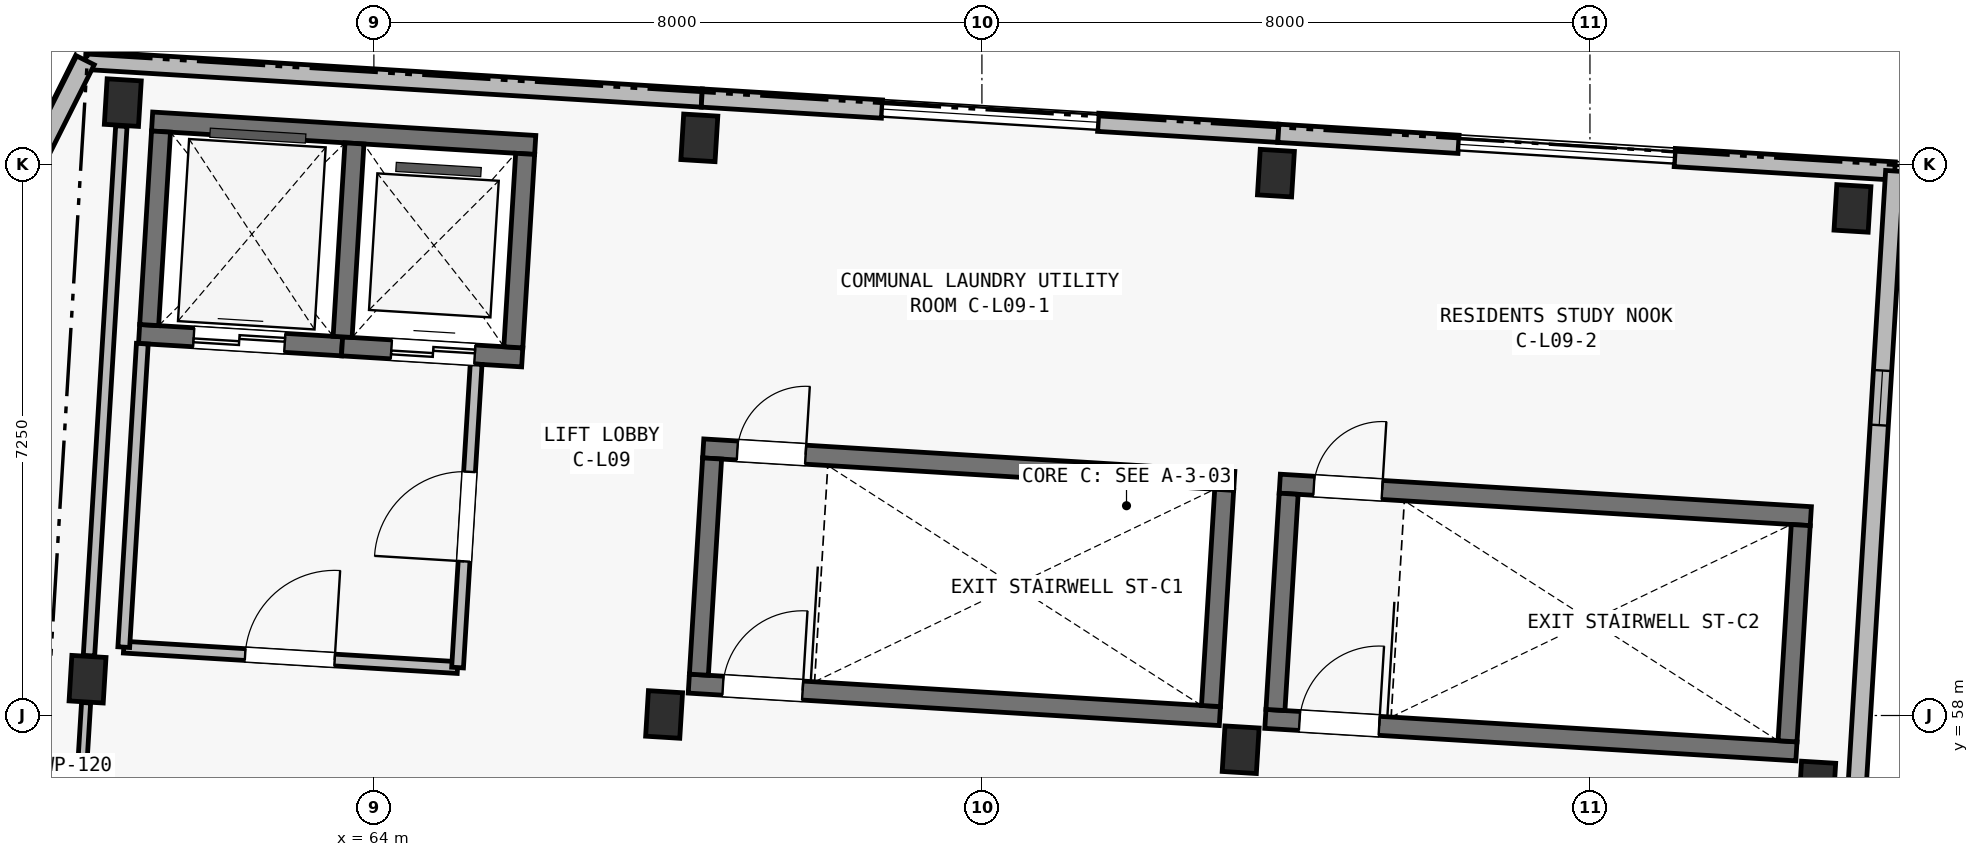
"""IFC4 building model, lengths in metres.
Left out: names, types, materials, properties, quantities, classifications, styles, units other than length and angle.
Written with IfcOpenShell. Run it as: python <this file> out.ifc"""

import sys

from ifc_helpers import new_model, si_unit, direction, frame, frame_2d, origin, origin_2d, place, context, subcontext, project, spatial, polyline, rectangle, outline, extrude, element, fill, save


model = new_model("IFC4")
c1 = context("Model", 3, precision=1e-05, world=origin(), true_north=direction((0.0, 1.0)))
c2 = subcontext(c1, "Body", "Model", "MODEL_VIEW")
j1 = project(units=[si_unit("LENGTHUNIT", "METRE"), si_unit("PLANEANGLEUNIT", "RADIAN")], contexts=[c1])
p1 = place(None, origin())
s1 = spatial("IfcSite", under=j1, at=p1, CompositionType="ELEMENT")
p2 = place(p1, origin())
s2 = spatial("IfcBuilding", under=s1, at=p2, CompositionType="ELEMENT")
p3 = place(p2, frame((0.0, 0.0, 31.15)))
s3 = spatial("IfcBuildingStorey", under=s2, at=p3, CompositionType="ELEMENT", Elevation=31.15)
for number, where, z_axis, x_axis in (
    (1, (60.233, 58.478, 0.0), (0.0, 0.0, 1.0), (0.998, -0.061, 0.0)),
    (2, (60.697, 66.063, 0.0), (0.0, 0.0, 1.0), (0.998, -0.061, 0.0)),
):
    element("IfcColumn", number, at=place(p3, frame(where, z_axis=z_axis, x_axis=x_axis)), inside=s3, PredefinedType="COLUMN", context=c2, shape_type="SweptSolid", body=[
        extrude(rectangle(XDim=0.45, YDim=0.6, at=origin_2d()), origin(), (0.0, 0.0, 1.0), 6.895),
    ])
for number, where, z_axis, x_axis in (
    (3, (67.818, 58.014, 0.0), (0.0, 0.0, 1.0), (0.998, -0.061, 0.0)),
    (4, (68.282, 65.599, 0.0), (0.0, 0.0, 1.0), (0.998, -0.061, 0.0)),
    (5, (75.404, 57.55, 0.0), (0.0, 0.0, 1.0), (0.998, -0.061, 0.0)),
    (6, (75.868, 65.135, 0.0), (0.0, 0.0, 1.0), (0.998, -0.061, 0.0)),
):
    element("IfcColumn", number, at=place(p3, frame(where, z_axis=z_axis, x_axis=x_axis)), inside=s3, PredefinedType="COLUMN", context=c2, shape_type="SweptSolid", body=[
        extrude(rectangle(XDim=0.45, YDim=0.6, at=origin_2d()), origin(), (0.0, 0.0, 1.0), 3.25),
    ])
for number, where, z_axis, x_axis in (
    (7, (82.99, 57.086, 0.0), (0.0, 0.0, 1.0), (0.998, -0.061, 0.0)),
    (8, (83.454, 64.672, 0.0), (0.0, 0.0, 1.0), (0.998, -0.061, 0.0)),
):
    element("IfcColumn", number, at=place(p3, frame(where, z_axis=z_axis, x_axis=x_axis)), inside=s3, PredefinedType="COLUMN", context=c2, shape_type="SweptSolid", body=[
        extrude(rectangle(XDim=0.45, YDim=0.6, at=origin_2d()), origin(), (0.0, 0.0, 1.0), 3.0),
    ])
p4 = place(p3, frame((61.082, 65.814, 0.0), z_axis=(0.0, 0.0, 1.0), x_axis=(0.998134101522, -0.061059932685, 0.0)))
e9 = element("IfcWall", 9, at=p4, inside=s3, PredefinedType="SHEAR", context=c2, shape_type="SweptSolid", body=[
    extrude(rectangle(XDim=5.05, YDim=0.25, at=frame_2d((2.525, 0.0))), origin(), (0.0, 0.0, 1.0), 4.35),
])
p5 = place(p3, frame((60.911, 63.02, 0.0), z_axis=(0.0, 0.0, 1.0), x_axis=(0.998134099905, -0.061059959111, 0.0)))
e10 = element("IfcWall", 10, at=p5, inside=s3, PredefinedType="SHEAR", context=c2, shape_type="SweptSolid", body=[
    extrude(rectangle(XDim=2.675, YDim=0.25, at=frame_2d((1.337, 0.0))), origin(), (0.0, 0.0, 1.0), 4.35),
])
p6 = place(p5, frame((0.72, 0.0, 0.0)))
e11 = element("IfcOpeningElement", 11, at=p6, cuts=e10, PredefinedType="OPENING", context=c2, shape_type="SweptSolid", body=[
    extrude(rectangle(XDim=1.2, YDim=2.2, at=frame_2d((0.6, 1.1))), frame((0.0, 0.14, 0.0), z_axis=(0.0, -1.0, 0.0), x_axis=(1.0, 0.0, 0.0)), (0.0, 0.0, 1.0), 0.28),
])
p7 = place(p3, frame((63.581, 62.856, 0.0), z_axis=(0.0, 0.0, 1.0), x_axis=(0.998134103342, -0.061059902923, 0.0)))
e12 = element("IfcWall", 12, at=p7, inside=s3, PredefinedType="SHEAR", context=c2, shape_type="SweptSolid", body=[
    extrude(rectangle(XDim=2.375, YDim=0.25, at=frame_2d((1.188, 0.0))), origin(), (0.0, 0.0, 1.0), 4.35),
])
p8 = place(p7, frame((0.65, 0.0, 0.0)))
e13 = element("IfcOpeningElement", 13, at=p8, cuts=e12, PredefinedType="OPENING", context=c2, shape_type="SweptSolid", body=[
    extrude(rectangle(XDim=1.1, YDim=2.15, at=frame_2d((0.55, 1.075))), frame((0.0, 0.14, 0.0), z_axis=(0.0, -1.0, 0.0), x_axis=(1.0, 0.0, 0.0)), (0.0, 0.0, 1.0), 0.28),
])
p9 = place(p3, frame((61.043, 63.137, 0.0), z_axis=(0.0, 0.0, 1.0), x_axis=(0.061078919587, 0.998132939834, 0.0)))
e14 = element("IfcWall", 14, at=p9, inside=s3, PredefinedType="SHEAR", context=c2, shape_type="SweptSolid", body=[
    extrude(rectangle(XDim=2.55, YDim=0.25, at=frame_2d((1.275, 0.0))), origin(), (0.0, 0.0, 1.0), 4.35),
])
p10 = place(p3, frame((63.589, 62.981, 0.0), z_axis=(0.0, 0.0, 1.0), x_axis=(0.060989368901, 0.998138415692, 0.0)))
e15 = element("IfcWall", 15, at=p10, inside=s3, PredefinedType="SHEAR", context=c2, shape_type="SweptSolid", body=[
    extrude(rectangle(XDim=2.55, YDim=0.25, at=frame_2d((1.275, 0.0))), origin(), (0.0, 0.0, 1.0), 4.35),
])
p11 = place(p3, frame((65.834, 62.844, 0.0), z_axis=(0.0, 0.0, 1.0), x_axis=(0.061084756616, 0.998132582631, 0.0)))
e16 = element("IfcWall", 16, at=p11, inside=s3, PredefinedType="SHEAR", context=c2, shape_type="SweptSolid", body=[
    extrude(rectangle(XDim=2.55, YDim=0.25, at=frame_2d((1.275, 0.0))), origin(), (0.0, 0.0, 1.0), 4.35),
])
p12 = place(p3, frame((68.333, 61.514, 0.0), z_axis=(0.0, 0.0, 1.0), x_axis=(0.998135676081, -0.061034188237, 0.0)))
e17 = element("IfcWall", 17, at=p12, inside=s3, PredefinedType="SHEAR", context=c2, shape_type="SweptSolid", body=[
    extrude(rectangle(XDim=7.0, YDim=0.25, at=frame_2d((3.5, 0.0))), origin(), (0.0, 0.0, 1.0), 3.25),
])
p13 = place(p12, frame((0.45, 0.0, 0.0)))
e18 = element("IfcOpeningElement", 18, at=p13, cuts=e17, PredefinedType="OPENING", context=c2, shape_type="SweptSolid", body=[
    extrude(rectangle(XDim=0.9, YDim=2.1, at=frame_2d((0.45, 1.05))), frame((0.0, 0.14, 0.0), z_axis=(0.0, -1.0, 0.0), x_axis=(1.0, 0.0, 0.0)), (0.0, 0.0, 1.0), 0.28),
])
p14 = place(p3, frame((68.144, 58.419, 0.0), z_axis=(0.0, 0.0, 1.0), x_axis=(0.998135546153, -0.061036313012, 0.0)))
e19 = element("IfcWall", 19, at=p14, inside=s3, PredefinedType="SHEAR", context=c2, shape_type="SweptSolid", body=[
    extrude(rectangle(XDim=7.0, YDim=0.25, at=frame_2d((3.5, 0.0))), origin(), (0.0, 0.0, 1.0), 3.25),
])
p15 = place(p14, frame((0.45, 0.0, 0.0)))
e20 = element("IfcOpeningElement", 20, at=p15, cuts=e19, PredefinedType="OPENING", context=c2, shape_type="SweptSolid", body=[
    extrude(rectangle(XDim=1.05, YDim=2.15, at=frame_2d((0.525, 1.075))), frame((0.0, 0.14, 0.0), z_axis=(0.0, -1.0, 0.0), x_axis=(1.0, 0.0, 0.0)), (0.0, 0.0, 1.0), 0.28),
])
for number, where, z_axis, x_axis in (
    (21, (68.276, 58.537, 0.0), (0.0, 0.0, 1.0), (0.061, 0.998, 0.0)),
    (22, (75.014, 58.125, 0.0), (0.0, 0.0, 1.0), (0.061, 0.998, 0.0)),
):
    element("IfcWall", number, at=place(p3, frame(where, z_axis=z_axis, x_axis=x_axis)), inside=s3, PredefinedType="SHEAR", context=c2, shape_type="SweptSolid", body=[
        extrude(rectangle(XDim=2.85, YDim=0.25, at=frame_2d((1.425, 0.0))), origin(), (0.0, 0.0, 1.0), 3.25),
    ])
p16 = place(p3, frame((75.919, 61.05, 0.0), z_axis=(0.0, 0.0, 1.0), x_axis=(0.998135546153, -0.061036313012, 0.0)))
e23 = element("IfcWall", 23, at=p16, inside=s3, PredefinedType="SHEAR", context=c2, shape_type="SweptSolid", body=[
    extrude(rectangle(XDim=7.0, YDim=0.25, at=frame_2d((3.5, 0.0))), origin(), (0.0, 0.0, 1.0), 2.708),
])
p17 = place(p16, frame((0.45, 0.0, 0.0)))
e24 = element("IfcOpeningElement", 24, at=p17, cuts=e23, PredefinedType="OPENING", context=c2, shape_type="SweptSolid", body=[
    extrude(rectangle(XDim=0.9, YDim=2.1, at=frame_2d((0.45, 1.05))), frame((0.0, 0.14, 0.0), z_axis=(0.0, -1.0, 0.0), x_axis=(1.0, 0.0, 0.0)), (0.0, 0.0, 1.0), 0.28),
])
p18 = place(p3, frame((75.73, 57.956, 0.0), z_axis=(0.0, 0.0, 1.0), x_axis=(0.998135546153, -0.061036313012, 0.0)))
e25 = element("IfcWall", 25, at=p18, inside=s3, PredefinedType="SHEAR", context=c2, shape_type="SweptSolid", body=[
    extrude(rectangle(XDim=7.0, YDim=0.25, at=frame_2d((3.5, 0.0))), origin(), (0.0, 0.0, 1.0), 2.708),
])
p19 = place(p18, frame((0.45, 0.0, 0.0)))
e26 = element("IfcOpeningElement", 26, at=p19, cuts=e25, PredefinedType="OPENING", context=c2, shape_type="SweptSolid", body=[
    extrude(rectangle(XDim=1.05, YDim=2.15, at=frame_2d((0.525, 1.075))), frame((0.0, 0.14, 0.0), z_axis=(0.0, -1.0, 0.0), x_axis=(1.0, 0.0, 0.0)), (0.0, 0.0, 1.0), 0.28),
])
for number, where, z_axis, x_axis in (
    (27, (75.862, 58.073, 0.0), (0.0, 0.0, 1.0), (0.061, 0.998, 0.0)),
    (28, (82.599, 57.661, 0.0), (0.0, 0.0, 1.0), (0.061, 0.998, 0.0)),
):
    element("IfcWall", number, at=place(p3, frame(where, z_axis=z_axis, x_axis=x_axis)), inside=s3, PredefinedType="SHEAR", context=c2, shape_type="SweptSolid", body=[
        extrude(rectangle(XDim=2.85, YDim=0.25, at=frame_2d((1.425, 0.0))), origin(), (0.0, 0.0, 1.0), 2.708),
    ])
p20 = place(p3, frame((60.205, 66.62, 0.0), z_axis=(0.0, 0.0, 1.0), x_axis=(0.998134248939, -0.061057522844, 0.0)))
e29 = element("IfcWall", 29, at=p20, inside=s3, PredefinedType="SOLIDWALL", context=c2, shape_type="SweptSolid", body=[
    extrude(outline(polyline([(0.0, 0.0), (8.125, 0.0), (8.125, 5.998), (0.0, 7.561), (0.0, 0.0)])), frame((0.0, 0.12, 0.0), z_axis=(0.0, -1.0, 0.0), x_axis=(1.0, 0.0, 0.0)), (0.0, 0.0, 1.0), 0.24),
])
p21 = place(p3, frame((68.314, 66.124, 0.0), z_axis=(0.0, 0.0, 1.0), x_axis=(0.998134103342, -0.061059902923, 0.0)))
e30 = element("IfcWall", 30, at=p21, inside=s3, PredefinedType="SOLIDWALL", context=c2, shape_type="SweptSolid", body=[
    extrude(outline(polyline([(0.0, 0.0), (2.375, 0.0), (2.375, 5.541), (0.0, 5.998), (0.0, 0.0)])), frame((0.0, 0.12, 0.0), z_axis=(0.0, -1.0, 0.0), x_axis=(1.0, 0.0, 0.0)), (0.0, 0.0, 1.0), 0.24),
])
p22 = place(p3, frame((73.53, 65.804, 0.0), z_axis=(0.0, 0.0, 1.0), x_axis=(0.998133720034, -0.061066168473, 0.0)))
e31 = element("IfcWall", 31, at=p22, inside=s3, PredefinedType="SOLIDWALL", context=c2, shape_type="SweptSolid", body=[
    extrude(outline(polyline([(0.0, 0.0), (2.375, 0.0), (2.375, 4.535), (0.0, 4.992), (0.0, 0.0)])), frame((0.0, 0.12, 0.0), z_axis=(0.0, -1.0, 0.0), x_axis=(1.0, 0.0, 0.0)), (0.0, 0.0, 1.0), 0.24),
])
p23 = place(p3, frame((75.9, 65.659, 0.0), z_axis=(0.0, 0.0, 1.0), x_axis=(0.998140363035, -0.06095749076, 0.0)))
e32 = element("IfcWall", 32, at=p23, inside=s3, PredefinedType="SOLIDWALL", context=c2, shape_type="SweptSolid", body=[
    extrude(outline(polyline([(0.0, 0.0), (2.375, 0.0), (2.375, 4.079), (0.0, 4.535), (0.0, 0.0)])), frame((0.0, 0.12, 0.0), z_axis=(0.0, -1.0, 0.0), x_axis=(1.0, 0.0, 0.0)), (0.0, 0.0, 1.0), 0.24),
])
p24 = place(p3, frame((81.115, 65.341, 0.0), z_axis=(0.0, 0.0, 1.0), x_axis=(0.998135537192, -0.061036459553, 0.0)))
e33 = element("IfcWall", 33, at=p24, inside=s3, PredefinedType="SOLIDWALL", context=c2, shape_type="SweptSolid", body=[
    extrude(outline(polyline([(0.0, 0.0), (2.9, 0.0), (2.9, 2.972), (0.0, 3.53), (0.0, 0.0)])), frame((0.0, 0.12, 0.0), z_axis=(0.0, -1.0, 0.0), x_axis=(1.0, 0.0, 0.0)), (0.0, 0.0, 1.0), 0.24),
])
p25 = place(p3, frame((51.654, 49.585, 0.0), z_axis=(0.0, 0.0, 1.0), x_axis=(0.448621989068, 0.893721607059, 0.0)))
e34 = element("IfcWall", 34, at=p25, inside=s3, PredefinedType="SOLIDWALL", context=c2, shape_type="SweptSolid", body=[
    extrude(outline(polyline([(0.0, 0.0), (19.061, 0.0), (19.06, 7.561), (0.0, 9.003), (0.0, 0.0)])), frame((0.0, 0.13, 0.0), z_axis=(0.0, -1.0, 0.0), x_axis=(1.0, 0.0, 0.0)), (0.0, 0.0, 1.0), 0.26),
])
p26 = place(p25, frame((2.63, 0.0, 0.52)))
e35 = element("IfcOpeningElement", 35, at=p26, cuts=e34, PredefinedType="OPENING", context=c2, shape_type="SweptSolid", body=[
    extrude(rectangle(XDim=0.76, YDim=2.34, at=frame_2d((0.38, 1.17))), frame((0.0, 0.145, 0.0), z_axis=(0.0, -1.0, 0.0), x_axis=(1.0, 0.0, 0.0)), (0.0, 0.0, 1.0), 0.29),
])
p27 = place(p25, frame((15.47, 0.0, 0.45)))
e36 = element("IfcOpeningElement", 36, at=p27, cuts=e34, PredefinedType="OPENING", context=c2, shape_type="SweptSolid", body=[
    extrude(rectangle(XDim=0.6, YDim=2.22, at=frame_2d((0.3, 1.11))), frame((0.0, 0.145, 0.0), z_axis=(0.0, -1.0, 0.0), x_axis=(1.0, 0.0, 0.0)), (0.0, 0.0, 1.0), 0.29),
])
p28 = place(p3, frame((84.01, 65.164, 0.0), z_axis=(0.0, 0.0, 1.0), x_axis=(-0.061040833846, -0.998135269692, 0.0)))
e37 = element("IfcWall", 37, at=p28, inside=s3, PredefinedType="SOLIDWALL", context=c2, shape_type="SweptSolid", body=[
    extrude(rectangle(XDim=20.65, YDim=0.24, at=frame_2d((10.325, 0.0))), origin(), (0.0, 0.0, 1.0), 2.972),
])
p29 = place(p28, frame((2.63, 0.0, 0.52)))
e38 = element("IfcOpeningElement", 38, at=p29, cuts=e37, PredefinedType="OPENING", context=c2, shape_type="SweptSolid", body=[
    extrude(rectangle(XDim=0.72, YDim=2.16, at=frame_2d((0.36, 1.08))), frame((0.0, 0.135, 0.0), z_axis=(0.0, -1.0, 0.0), x_axis=(1.0, 0.0, 0.0)), (0.0, 0.0, 1.0), 0.27),
])
p30 = place(p28, frame((16.8, 0.0, 0.45)))
e39 = element("IfcOpeningElement", 39, at=p30, cuts=e37, PredefinedType="OPENING", context=c2, shape_type="SweptSolid", body=[
    extrude(rectangle(XDim=0.86, YDim=2.36, at=frame_2d((0.43, 1.18))), frame((0.0, 0.135, 0.0), z_axis=(0.0, -1.0, 0.0), x_axis=(1.0, 0.0, 0.0)), (0.0, 0.0, 1.0), 0.27),
])
p31 = place(p3, frame((60.709, 58.899, 0.0), z_axis=(0.0, 0.0, 1.0), x_axis=(0.998132276607, -0.061089756882, 0.0)))
e40 = element("IfcWall", 40, at=p31, inside=s3, PredefinedType="PARTITIONING", context=c2, shape_type="SweptSolid", body=[
    extrude(rectangle(XDim=4.4, YDim=0.155, at=frame_2d((2.2, 0.0))), origin(), (0.0, 0.0, 1.0), 3.15),
])
p32 = place(p31, frame((1.6, 0.0, 0.0)))
e41 = element("IfcOpeningElement", 41, at=p32, cuts=e40, PredefinedType="OPENING", context=c2, shape_type="SweptSolid", body=[
    extrude(rectangle(XDim=1.18, YDim=2.15, at=frame_2d((0.59, 1.075))), frame((0.0, 0.093, 0.0), z_axis=(0.0, -1.0, 0.0), x_axis=(1.0, 0.0, 0.0)), (0.0, 0.0, 1.0), 0.185),
])
p33 = place(p3, frame((60.709, 58.899, 0.0), z_axis=(0.0, 0.0, 1.0), x_axis=(0.061036844229, 0.998135513669, 0.0)))
e42 = element("IfcWall", 42, at=p33, inside=s3, PredefinedType="PARTITIONING", context=c2, shape_type="SweptSolid", body=[
    extrude(rectangle(XDim=4.0, YDim=0.155, at=frame_2d((2.0, 0.0))), origin(), (0.0, 0.0, 1.0), 3.15),
])
p34 = place(p3, frame((65.101, 58.631, 0.0), z_axis=(0.0, 0.0, 1.0), x_axis=(0.061033125904, 0.99813574104, 0.0)))
e43 = element("IfcWall", 43, at=p34, inside=s3, PredefinedType="PARTITIONING", context=c2, shape_type="SweptSolid", body=[
    extrude(rectangle(XDim=4.0, YDim=0.155, at=frame_2d((2.0, 0.0))), origin(), (0.0, 0.0, 1.0), 3.15),
])
p35 = place(p34, frame((1.4, 0.0, 0.0)))
e44 = element("IfcOpeningElement", 44, at=p35, cuts=e43, PredefinedType="OPENING", context=c2, shape_type="SweptSolid", body=[
    extrude(rectangle(XDim=1.18, YDim=2.15, at=frame_2d((0.59, 1.075))), frame((0.0, 0.093, 0.0), z_axis=(0.0, -1.0, 0.0), x_axis=(1.0, 0.0, 0.0)), (0.0, 0.0, 1.0), 0.185),
])
p36 = place(p3, frame((59.983, 54.395, 0.0), z_axis=(0.0, 0.0, 1.0), x_axis=(0.061035211258, 0.998135613525, 0.0)))
e45 = element("IfcWall", 45, at=p36, inside=s3, PredefinedType="PARTITIONING", context=c2, shape_type="SweptSolid", body=[
    extrude(rectangle(XDim=3.78, YDim=0.12, at=frame_2d((1.89, 0.0))), origin(), (0.0, 0.0, 1.0), 3.15),
])
p37 = place(p36, frame((1.35, 0.0, 0.0)))
e46 = element("IfcOpeningElement", 46, at=p37, cuts=e45, PredefinedType="OPENING", context=c2, shape_type="SweptSolid", body=[
    extrude(rectangle(XDim=0.88, YDim=2.1, at=frame_2d((0.44, 1.05))), frame((0.0, 0.075, 0.0), z_axis=(0.0, -1.0, 0.0), x_axis=(1.0, 0.0, 0.0)), (0.0, 0.0, 1.0), 0.15),
])
p38 = place(p3, frame((60.251, 58.787, 0.0), z_axis=(0.0, 0.0, 1.0), x_axis=(0.061071659957, 0.998133384047, 0.0)))
e47 = element("IfcWall", 47, at=p38, inside=s3, PredefinedType="PARTITIONING", context=c2, shape_type="SweptSolid", body=[
    extrude(rectangle(XDim=6.98, YDim=0.15, at=frame_2d((3.49, 0.0))), origin(), (0.0, 0.0, 1.0), 3.15),
])
p39 = place(p29, origin())
e48 = element("IfcWindow", 48, at=p39, inside=s3, PartitioningType="SINGLE_PANEL", PredefinedType="WINDOW", context=c2, shape_type="SweptSolid", body=[
    extrude(rectangle(XDim=0.72, YDim=2.16, at=frame_2d((0.36, 1.08))), frame((0.0, 0.03, 0.0), z_axis=(0.0, -1.0, 0.0), x_axis=(1.0, 0.0, 0.0)), (0.0, 0.0, 1.0), 0.06),
])
fill(e38, e48)
p40 = place(p32, origin())
e49 = element("IfcDoor", 49, at=p40, inside=s3, OperationType="SINGLE_SWING_RIGHT", PredefinedType="DOOR", context=c2, shape_type="SweptSolid", body=[
    extrude(rectangle(XDim=1.18, YDim=2.15, at=frame_2d((0.59, 1.075))), frame((0.0, 0.025, 0.0), z_axis=(0.0, -1.0, 0.0), x_axis=(1.0, 0.0, 0.0)), (0.0, 0.0, 1.0), 0.05),
])
fill(e41, e49)
p41 = place(p35, origin())
e50 = element("IfcDoor", 50, at=p41, inside=s3, OperationType="SINGLE_SWING_LEFT", PredefinedType="DOOR", context=c2, shape_type="SweptSolid", body=[
    extrude(rectangle(XDim=1.18, YDim=2.15, at=frame_2d((0.59, 1.075))), frame((0.0, 0.025, 0.0), z_axis=(0.0, -1.0, 0.0), x_axis=(1.0, 0.0, 0.0)), (0.0, 0.0, 1.0), 0.05),
])
fill(e44, e50)
p42 = place(p15, origin())
e51 = element("IfcDoor", 51, at=p42, inside=s3, OperationType="SINGLE_SWING_RIGHT", PredefinedType="DOOR", context=c2, shape_type="SweptSolid", body=[
    extrude(rectangle(XDim=1.05, YDim=2.15, at=frame_2d((0.525, 1.075))), frame((0.0, 0.025, 0.0), z_axis=(0.0, -1.0, 0.0), x_axis=(1.0, 0.0, 0.0)), (0.0, 0.0, 1.0), 0.05),
])
fill(e20, e51)
p43 = place(p13, origin())
e52 = element("IfcDoor", 52, at=p43, inside=s3, OperationType="SINGLE_SWING_RIGHT", PredefinedType="DOOR", context=c2, shape_type="SweptSolid", body=[
    extrude(rectangle(XDim=0.9, YDim=2.1, at=frame_2d((0.45, 1.05))), frame((0.0, 0.025, 0.0), z_axis=(0.0, -1.0, 0.0), x_axis=(1.0, 0.0, 0.0)), (0.0, 0.0, 1.0), 0.05),
])
fill(e18, e52)
p44 = place(p19, origin())
e53 = element("IfcDoor", 53, at=p44, inside=s3, OperationType="SINGLE_SWING_RIGHT", PredefinedType="DOOR", context=c2, shape_type="SweptSolid", body=[
    extrude(rectangle(XDim=1.05, YDim=2.15, at=frame_2d((0.525, 1.075))), frame((0.0, 0.025, 0.0), z_axis=(0.0, -1.0, 0.0), x_axis=(1.0, 0.0, 0.0)), (0.0, 0.0, 1.0), 0.05),
])
fill(e26, e53)
p45 = place(p17, origin())
e54 = element("IfcDoor", 54, at=p45, inside=s3, OperationType="SINGLE_SWING_RIGHT", PredefinedType="DOOR", context=c2, shape_type="SweptSolid", body=[
    extrude(rectangle(XDim=0.9, YDim=2.1, at=frame_2d((0.45, 1.05))), frame((0.0, 0.025, 0.0), z_axis=(0.0, -1.0, 0.0), x_axis=(1.0, 0.0, 0.0)), (0.0, 0.0, 1.0), 0.05),
])
fill(e24, e54)
p46 = place(p6, origin())
e55 = element("IfcDoor", 55, at=p46, inside=s3, OperationType="DOUBLE_DOOR_SLIDING", PredefinedType="DOOR", context=c2, shape_type="SweptSolid", body=[
    extrude(rectangle(XDim=1.2, YDim=2.2, at=frame_2d((0.6, 1.1))), frame((0.0, 0.025, 0.0), z_axis=(0.0, -1.0, 0.0), x_axis=(1.0, 0.0, 0.0)), (0.0, 0.0, 1.0), 0.05),
])
fill(e11, e55)
p47 = place(p8, origin())
e56 = element("IfcDoor", 56, at=p47, inside=s3, OperationType="DOUBLE_DOOR_SLIDING", PredefinedType="DOOR", context=c2, shape_type="SweptSolid", body=[
    extrude(rectangle(XDim=1.1, YDim=2.15, at=frame_2d((0.55, 1.075))), frame((0.0, 0.025, 0.0), z_axis=(0.0, -1.0, 0.0), x_axis=(1.0, 0.0, 0.0)), (0.0, 0.0, 1.0), 0.05),
])
fill(e13, e56)
save(model, sys.argv[1])
